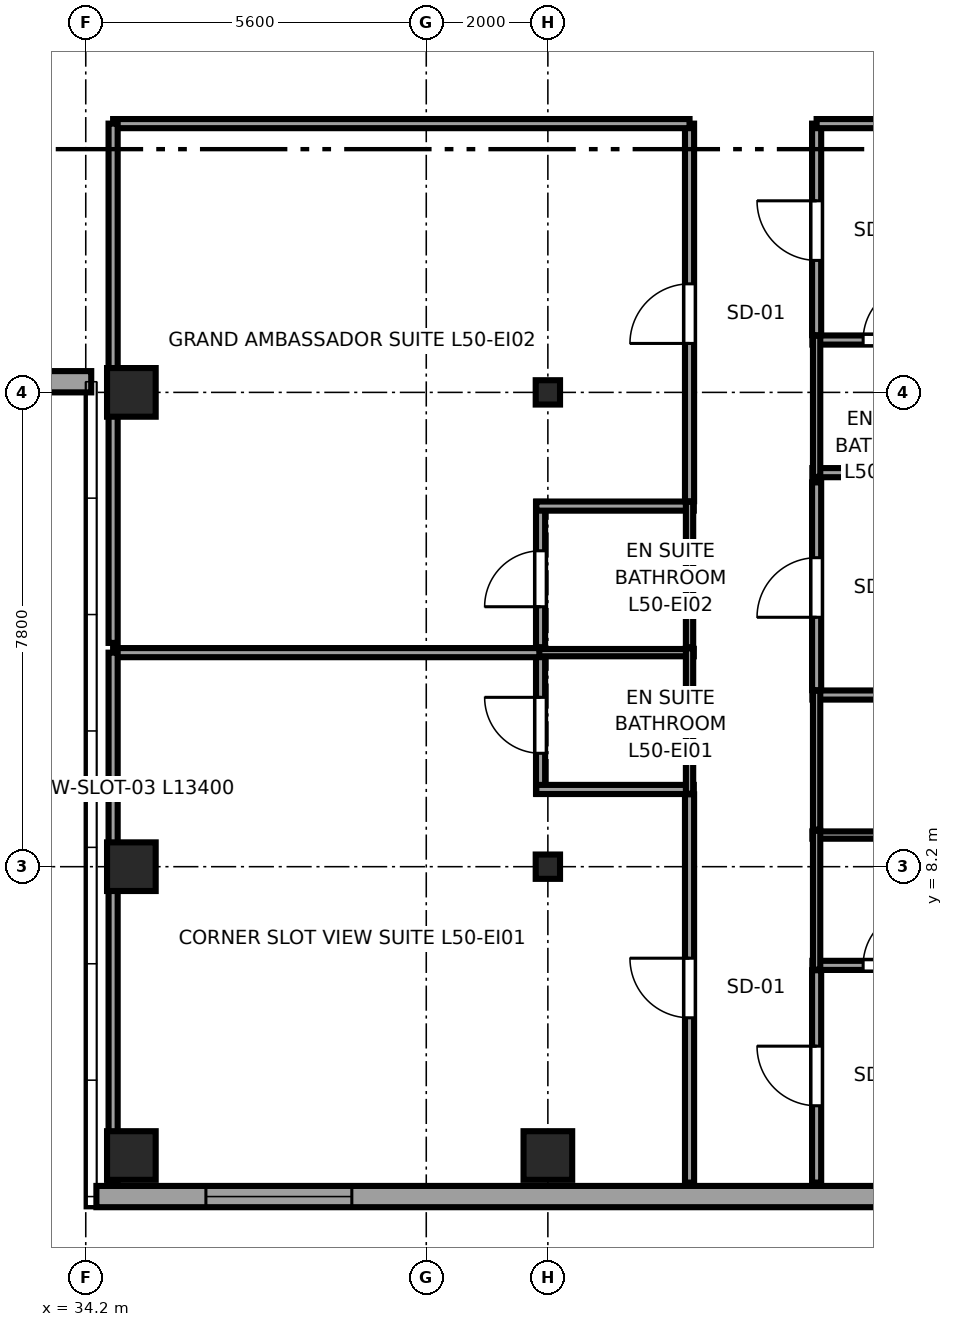
"""IFC4 building model, lengths in metres.
Left out: names, types, materials, properties, quantities, classifications, styles, units other than length and angle.
Written with IfcOpenShell. Run it as: python <this file> out.ifc"""

import sys

from ifc_helpers import new_model, si_unit, direction, frame, frame_2d, origin, origin_2d, place, context, subcontext, project, spatial, rectangle, i_section, extrude, source, transform, mapped, element, fill, save


model = new_model("IFC4")
c1 = context("Model", 3, precision=1e-05, world=origin(), true_north=direction((0.0, 1.0)))
c2 = subcontext(c1, "Body", "Model", "MODEL_VIEW")
j1 = project(units=[si_unit("LENGTHUNIT", "METRE"), si_unit("PLANEANGLEUNIT", "RADIAN")], contexts=[c1])
p1 = place(None, origin())
s1 = spatial("IfcSite", under=j1, at=p1, CompositionType="ELEMENT")
p2 = place(p1, origin())
s2 = spatial("IfcBuilding", under=s1, at=p2, CompositionType="ELEMENT")
p3 = place(p2, frame((0.0, 0.0, 191.1)))
s3 = spatial("IfcBuildingStorey", under=s2, at=p3, CompositionType="ELEMENT", Elevation=191.1)
m1 = source(origin(), c2, "Body", "SweptSolid", [
    extrude(rectangle(XDim=0.8, YDim=0.8, at=origin_2d()), origin(), (0.0, 0.0, 1.0), 3.55),
])
for number, where, z_axis, x_axis in (
    (1, (34.95, 3.45, 0.0), (0.0, 0.0, 1.0), (1.0, 0.0, 0.0)),
    (2, (34.95, 8.2, 0.0), (0.0, 0.0, 1.0), (1.0, 0.0, 0.0)),
    (3, (34.95, 16.0, 0.0), (0.0, 0.0, 1.0), (1.0, 0.0, 0.0)),
    (4, (41.8, 3.45, 0.0), (0.0, 0.0, 1.0), (1.0, 0.0, 0.0)),
):
    element("IfcColumn", number, at=place(p3, frame(where, z_axis=z_axis, x_axis=x_axis)), inside=s3, PredefinedType="COLUMN", context=c2, shape_type="MappedRepresentation", body=[
        mapped(m1, transform((0.0, 0.0, 0.0), x_axis=(1.0, 0.0, 0.0), y_axis=(0.0, 1.0, 0.0), z_axis=(0.0, 0.0, 1.0), scale=1.0)),
    ])
m2 = source(origin(), c2, "Body", "SweptSolid", [
    extrude(i_section(OverallWidth=0.4, OverallDepth=0.4, WebThickness=0.02, FlangeThickness=0.035, at=origin_2d()), origin(), (0.0, 0.0, 1.0), 3.55),
])
for number, where, z_axis, x_axis in (
    (5, (41.8, 8.2, 0.0), (0.0, 0.0, 1.0), (1.0, 0.0, 0.0)),
    (6, (41.8, 16.0, 0.0), (0.0, 0.0, 1.0), (1.0, 0.0, 0.0)),
):
    element("IfcColumn", number, at=place(p3, frame(where, z_axis=z_axis, x_axis=x_axis)), inside=s3, PredefinedType="COLUMN", context=c2, shape_type="MappedRepresentation", body=[
        mapped(m2, transform((0.0, 0.0, 0.0), x_axis=(1.0, 0.0, 0.0), y_axis=(0.0, 1.0, 0.0), z_axis=(0.0, 0.0, 1.0), scale=1.0)),
    ])
p4 = place(p3, frame((22.71, 16.175, 0.0), z_axis=(0.0, 0.0, 1.0), x_axis=(1.0, 0.0, 0.0)))
e7 = element("IfcWall", 7, at=p4, inside=s3, PredefinedType="SOLIDWALL", context=c2, shape_type="SweptSolid", body=[
    extrude(rectangle(XDim=11.58, YDim=0.35, at=frame_2d((5.79, 0.0))), origin(), (0.0, 0.0, 1.0), 2.758),
])
p5 = place(p4, frame((1.995, 0.0, 0.68)))
e8 = element("IfcOpeningElement", 8, at=p5, cuts=e7, PredefinedType="OPENING", context=c2, shape_type="SweptSolid", body=[
    extrude(rectangle(XDim=2.4, YDim=1.9, at=frame_2d((1.2, 0.95))), frame((0.0, 0.185, 0.0), z_axis=(0.0, -1.0, 0.0), x_axis=(1.0, 0.0, 0.0)), (0.0, 0.0, 1.0), 0.37),
])
p6 = place(p4, frame((7.185, 0.0, 0.68)))
e9 = element("IfcOpeningElement", 9, at=p6, cuts=e7, PredefinedType="OPENING", context=c2, shape_type="SweptSolid", body=[
    extrude(rectangle(XDim=2.4, YDim=1.9, at=frame_2d((1.2, 0.95))), frame((0.0, 0.185, 0.0), z_axis=(0.0, -1.0, 0.0), x_axis=(1.0, 0.0, 0.0)), (0.0, 0.0, 1.0), 0.37),
])
p7 = place(p3, frame((34.375, 2.775, 0.0), z_axis=(0.0, 0.0, 1.0), x_axis=(1.0, 0.0, 0.0)))
e10 = element("IfcWall", 10, at=p7, inside=s3, PredefinedType="SOLIDWALL", context=c2, shape_type="SweptSolid", body=[
    extrude(rectangle(XDim=15.608, YDim=0.35, at=frame_2d((7.804, 0.0))), origin(), (0.0, 0.0, 1.0), 3.37),
])
p8 = place(p7, frame((1.801, 0.0, 0.68)))
e11 = element("IfcOpeningElement", 11, at=p8, cuts=e10, PredefinedType="OPENING", context=c2, shape_type="SweptSolid", body=[
    extrude(rectangle(XDim=2.4, YDim=1.9, at=frame_2d((1.2, 0.95))), frame((0.0, 0.185, 0.0), z_axis=(0.0, -1.0, 0.0), x_axis=(1.0, 0.0, 0.0)), (0.0, 0.0, 1.0), 0.37),
])
p9 = place(p7, frame((12.891, 0.0, 0.62)))
e12 = element("IfcOpeningElement", 12, at=p9, cuts=e10, PredefinedType="OPENING", context=c2, shape_type="SweptSolid", body=[
    extrude(rectangle(XDim=1.5, YDim=1.55, at=frame_2d((0.75, 0.775))), frame((0.0, 0.185, 0.0), z_axis=(0.0, -1.0, 0.0), x_axis=(1.0, 0.0, 0.0)), (0.0, 0.0, 1.0), 0.37),
])
p10 = place(p3, frame((41.68, 9.4, 0.0), z_axis=(0.0, 0.0, 1.0), x_axis=(0.0, 1.0, 0.0)))
e13 = element("IfcWall", 13, at=p10, inside=s3, PredefinedType="PARTITIONING", context=c2, shape_type="SweptSolid", body=[
    extrude(rectangle(XDim=2.39, YDim=0.15, at=frame_2d((1.195, 0.0))), origin(), (0.0, 0.0, 1.0), 2.827),
])
p11 = place(p10, frame((0.665, 0.0, 0.0)))
e14 = element("IfcOpeningElement", 14, at=p11, cuts=e13, PredefinedType="OPENING", context=c2, shape_type="SweptSolid", body=[
    extrude(rectangle(XDim=0.92, YDim=2.01, at=frame_2d((0.46, 1.005))), frame((0.0, 0.085, 0.0), z_axis=(0.0, -1.0, 0.0), x_axis=(1.0, 0.0, 0.0)), (0.0, 0.0, 1.0), 0.17),
])
p12 = place(p3, frame((41.61, 9.47, 0.0), z_axis=(0.0, 0.0, 1.0), x_axis=(1.0, 0.0, 0.0)))
e15 = element("IfcWall", 15, at=p12, inside=s3, PredefinedType="PARTITIONING", context=c2, shape_type="SweptSolid", body=[
    extrude(rectangle(XDim=2.59, YDim=0.15, at=frame_2d((1.295, 0.0))), origin(), (0.0, 0.0, 1.0), 3.37),
])
p13 = place(p3, frame((41.61, 11.72, 0.0), z_axis=(0.0, 0.0, 1.0), x_axis=(1.0, 0.0, 0.0)))
e16 = element("IfcWall", 16, at=p13, inside=s3, PredefinedType="PLUMBINGWALL", context=c2, shape_type="SweptSolid", body=[
    extrude(rectangle(XDim=2.59, YDim=0.12, at=frame_2d((1.295, 0.0))), origin(), (0.0, 0.0, 1.0), 3.37),
])
p14 = place(p3, frame((44.13, 9.4, 0.0), z_axis=(0.0, 0.0, 1.0), x_axis=(0.0, 1.0, 0.0)))
e17 = element("IfcWall", 17, at=p14, inside=s3, PredefinedType="PLUMBINGWALL", context=c2, shape_type="SweptSolid", body=[
    extrude(rectangle(XDim=2.39, YDim=0.12, at=frame_2d((1.195, 0.0))), origin(), (0.0, 0.0, 1.0), 3.37),
])
p15 = place(p3, frame((41.68, 11.81, 0.0), z_axis=(0.0, 0.0, 1.0), x_axis=(0.0, 1.0, 0.0)))
e18 = element("IfcWall", 18, at=p15, inside=s3, PredefinedType="PARTITIONING", context=c2, shape_type="SweptSolid", body=[
    extrude(rectangle(XDim=2.39, YDim=0.15, at=frame_2d((1.195, 0.0))), origin(), (0.0, 0.0, 1.0), 2.827),
])
p16 = place(p15, frame((0.665, 0.0, 0.0)))
e19 = element("IfcOpeningElement", 19, at=p16, cuts=e18, PredefinedType="OPENING", context=c2, shape_type="SweptSolid", body=[
    extrude(rectangle(XDim=0.92, YDim=2.01, at=frame_2d((0.46, 1.005))), frame((0.0, 0.085, 0.0), z_axis=(0.0, -1.0, 0.0), x_axis=(1.0, 0.0, 0.0)), (0.0, 0.0, 1.0), 0.17),
])
p17 = place(p3, frame((41.61, 14.13, 0.0), z_axis=(0.0, 0.0, 1.0), x_axis=(1.0, 0.0, 0.0)))
e20 = element("IfcWall", 20, at=p17, inside=s3, PredefinedType="PARTITIONING", context=c2, shape_type="SweptSolid", body=[
    extrude(rectangle(XDim=2.59, YDim=0.15, at=frame_2d((1.295, 0.0))), origin(), (0.0, 0.0, 1.0), 3.37),
])
p18 = place(p3, frame((44.13, 11.81, 0.0), z_axis=(0.0, 0.0, 1.0), x_axis=(0.0, 1.0, 0.0)))
e21 = element("IfcWall", 21, at=p18, inside=s3, PredefinedType="PLUMBINGWALL", context=c2, shape_type="SweptSolid", body=[
    extrude(rectangle(XDim=2.39, YDim=0.12, at=frame_2d((1.195, 0.0))), origin(), (0.0, 0.0, 1.0), 3.37),
])
p19 = place(p3, frame((46.15, 6.577, 0.0), z_axis=(0.0, 0.0, 1.0), x_axis=(1.0, 0.0, 0.0)))
e22 = element("IfcWall", 22, at=p19, inside=s3, PredefinedType="PARTITIONING", context=c2, shape_type="SweptSolid", body=[
    extrude(rectangle(XDim=2.59, YDim=0.15, at=frame_2d((1.295, 0.0))), origin(), (0.0, 0.0, 1.0), 3.37),
])
p20 = place(p19, frame((0.835, 0.0, 0.0)))
e23 = element("IfcOpeningElement", 23, at=p20, cuts=e22, PredefinedType="OPENING", context=c2, shape_type="SweptSolid", body=[
    extrude(rectangle(XDim=0.92, YDim=2.01, at=frame_2d((0.46, 1.005))), frame((0.0, 0.085, 0.0), z_axis=(0.0, -1.0, 0.0), x_axis=(1.0, 0.0, 0.0)), (0.0, 0.0, 1.0), 0.17),
])
p21 = place(p3, frame((46.15, 8.72, 0.0), z_axis=(0.0, 0.0, 1.0), x_axis=(1.0, 0.0, 0.0)))
e24 = element("IfcWall", 24, at=p21, inside=s3, PredefinedType="PLUMBINGWALL", context=c2, shape_type="SweptSolid", body=[
    extrude(rectangle(XDim=2.59, YDim=0.12, at=frame_2d((1.295, 0.0))), origin(), (0.0, 0.0, 1.0), 3.37),
])
p22 = place(p3, frame((46.22, 6.507, 0.0), z_axis=(0.0, 0.0, 1.0), x_axis=(0.0, 1.0, 0.0)))
e25 = element("IfcWall", 25, at=p22, inside=s3, PredefinedType="PLUMBINGWALL", context=c2, shape_type="SweptSolid", body=[
    extrude(rectangle(XDim=2.283, YDim=0.12, at=frame_2d((1.142, 0.0))), origin(), (0.0, 0.0, 1.0), 3.37),
])
p23 = place(p3, frame((46.15, 11.023, 0.0), z_axis=(0.0, 0.0, 1.0), x_axis=(1.0, 0.0, 0.0)))
e26 = element("IfcWall", 26, at=p23, inside=s3, PredefinedType="PARTITIONING", context=c2, shape_type="SweptSolid", body=[
    extrude(rectangle(XDim=2.59, YDim=0.15, at=frame_2d((1.295, 0.0))), origin(), (0.0, 0.0, 1.0), 3.37),
])
p24 = place(p3, frame((46.22, 8.81, 0.0), z_axis=(0.0, 0.0, 1.0), x_axis=(0.0, 1.0, 0.0)))
e27 = element("IfcWall", 27, at=p24, inside=s3, PredefinedType="PLUMBINGWALL", context=c2, shape_type="SweptSolid", body=[
    extrude(rectangle(XDim=2.283, YDim=0.12, at=frame_2d((1.142, 0.0))), origin(), (0.0, 0.0, 1.0), 3.37),
])
p25 = place(p3, frame((46.15, 14.68, 0.0), z_axis=(0.0, 0.0, 1.0), x_axis=(1.0, 0.0, 0.0)))
e28 = element("IfcWall", 28, at=p25, inside=s3, PredefinedType="PARTITIONING", context=c2, shape_type="SweptSolid", body=[
    extrude(rectangle(XDim=7.845, YDim=0.15, at=frame_2d((3.923, 0.0))), origin(), (0.0, 0.0, 1.0), 3.37),
])
p26 = place(p3, frame((46.15, 16.861, 0.0), z_axis=(0.0, 0.0, 1.0), x_axis=(1.0, 0.0, 0.0)))
e29 = element("IfcWall", 29, at=p26, inside=s3, PredefinedType="PARTITIONING", context=c2, shape_type="SweptSolid", body=[
    extrude(rectangle(XDim=2.59, YDim=0.15, at=frame_2d((1.295, 0.0))), origin(), (0.0, 0.0, 1.0), 3.37),
])
p27 = place(p26, frame((0.835, 0.0, 0.0)))
e30 = element("IfcOpeningElement", 30, at=p27, cuts=e29, PredefinedType="OPENING", context=c2, shape_type="SweptSolid", body=[
    extrude(rectangle(XDim=0.92, YDim=2.01, at=frame_2d((0.46, 1.005))), frame((0.0, 0.085, 0.0), z_axis=(0.0, -1.0, 0.0), x_axis=(1.0, 0.0, 0.0)), (0.0, 0.0, 1.0), 0.17),
])
p28 = place(p3, frame((46.22, 14.61, 0.0), z_axis=(0.0, 0.0, 1.0), x_axis=(0.0, 1.0, 0.0)))
e31 = element("IfcWall", 31, at=p28, inside=s3, PredefinedType="PLUMBINGWALL", context=c2, shape_type="SweptSolid", body=[
    extrude(rectangle(XDim=2.321, YDim=0.12, at=frame_2d((1.16, 0.0))), origin(), (0.0, 0.0, 1.0), 3.37),
])
p29 = place(p3, frame((44.13, 3.005, 0.0), z_axis=(0.0, 0.0, 1.0), x_axis=(0.0, 1.0, 0.0)))
e32 = element("IfcWall", 32, at=p29, inside=s3, PredefinedType="PARTITIONING", context=c2, shape_type="SweptSolid", body=[
    extrude(rectangle(XDim=6.385, YDim=0.15, at=frame_2d((3.192, 0.0))), origin(), (0.0, 0.0, 1.0), 3.37),
])
p30 = place(p29, frame((2.71, 0.0, 0.0)))
e33 = element("IfcOpeningElement", 33, at=p30, cuts=e32, PredefinedType="OPENING", context=c2, shape_type="SweptSolid", body=[
    extrude(rectangle(XDim=0.98, YDim=2.12, at=frame_2d((0.49, 1.06))), frame((0.0, 0.085, 0.0), z_axis=(0.0, -1.0, 0.0), x_axis=(1.0, 0.0, 0.0)), (0.0, 0.0, 1.0), 0.17),
])
p31 = place(p3, frame((34.65, 11.72, 0.0), z_axis=(0.0, 0.0, 1.0), x_axis=(1.0, 0.0, 0.0)))
e34 = element("IfcWall", 34, at=p31, inside=s3, PredefinedType="PARTITIONING", context=c2, shape_type="SweptSolid", body=[
    extrude(rectangle(XDim=7.01, YDim=0.15, at=frame_2d((3.505, 0.0))), origin(), (0.0, 0.0, 1.0), 3.37),
])
p32 = place(p3, frame((34.65, 3.005, 0.0), z_axis=(0.0, 0.0, 1.0), x_axis=(0.0, 1.0, 0.0)))
e35 = element("IfcWall", 35, at=p32, inside=s3, PredefinedType="PARTITIONING", context=c2, shape_type="SweptSolid", body=[
    extrude(rectangle(XDim=8.715, YDim=0.15, at=frame_2d((4.357, 0.0))), origin(), (0.0, 0.0, 1.0), 3.37),
])
p33 = place(p3, frame((44.13, 14.21, 0.0), z_axis=(0.0, 0.0, 1.0), x_axis=(0.0, 1.0, 0.0)))
e36 = element("IfcWall", 36, at=p33, inside=s3, PredefinedType="PARTITIONING", context=c2, shape_type="SweptSolid", body=[
    extrude(rectangle(XDim=6.21, YDim=0.15, at=frame_2d((3.105, 0.0))), origin(), (0.0, 0.0, 1.0), 3.37),
])
p34 = place(p33, frame((2.595, 0.0, 0.0)))
e37 = element("IfcOpeningElement", 37, at=p34, cuts=e36, PredefinedType="OPENING", context=c2, shape_type="SweptSolid", body=[
    extrude(rectangle(XDim=0.98, YDim=2.12, at=frame_2d((0.49, 1.06))), frame((0.0, 0.085, 0.0), z_axis=(0.0, -1.0, 0.0), x_axis=(1.0, 0.0, 0.0)), (0.0, 0.0, 1.0), 0.17),
])
p35 = place(p3, frame((34.65, 20.42, 0.0), z_axis=(0.0, 0.0, 1.0), x_axis=(1.0, 0.0, 0.0)))
e38 = element("IfcWall", 38, at=p35, inside=s3, PredefinedType="PARTITIONING", context=c2, shape_type="SweptSolid", body=[
    extrude(rectangle(XDim=9.48, YDim=0.15, at=frame_2d((4.74, 0.0))), origin(), (0.0, 0.0, 1.0), 3.37),
])
p36 = place(p3, frame((34.65, 11.88, 0.0), z_axis=(0.0, 0.0, 1.0), x_axis=(0.0, 1.0, 0.0)))
e39 = element("IfcWall", 39, at=p36, inside=s3, PredefinedType="PARTITIONING", context=c2, shape_type="SweptSolid", body=[
    extrude(rectangle(XDim=8.54, YDim=0.15, at=frame_2d((4.27, 0.0))), origin(), (0.0, 0.0, 1.0), 3.37),
])
p37 = place(p3, frame((46.22, 3.005, 0.0), z_axis=(0.0, 0.0, 1.0), x_axis=(0.0, 1.0, 0.0)))
e40 = element("IfcWall", 40, at=p37, inside=s3, PredefinedType="PARTITIONING", context=c2, shape_type="SweptSolid", body=[
    extrude(rectangle(XDim=3.492, YDim=0.15, at=frame_2d((1.746, 0.0))), origin(), (0.0, 0.0, 1.0), 3.37),
])
p38 = place(p37, frame((1.263, 0.0, 0.0)))
e41 = element("IfcOpeningElement", 41, at=p38, cuts=e40, PredefinedType="OPENING", context=c2, shape_type="SweptSolid", body=[
    extrude(rectangle(XDim=0.98, YDim=2.12, at=frame_2d((0.49, 1.06))), frame((0.0, 0.085, 0.0), z_axis=(0.0, -1.0, 0.0), x_axis=(1.0, 0.0, 0.0)), (0.0, 0.0, 1.0), 0.17),
])
p39 = place(p3, frame((46.22, 11.103, 0.0), z_axis=(0.0, 0.0, 1.0), x_axis=(0.0, 1.0, 0.0)))
e42 = element("IfcWall", 42, at=p39, inside=s3, PredefinedType="PARTITIONING", context=c2, shape_type="SweptSolid", body=[
    extrude(rectangle(XDim=3.417, YDim=0.15, at=frame_2d((1.708, 0.0))), origin(), (0.0, 0.0, 1.0), 3.37),
])
p40 = place(p39, frame((1.198, 0.0, 0.0)))
e43 = element("IfcOpeningElement", 43, at=p40, cuts=e42, PredefinedType="OPENING", context=c2, shape_type="SweptSolid", body=[
    extrude(rectangle(XDim=0.98, YDim=2.12, at=frame_2d((0.49, 1.06))), frame((0.0, 0.085, 0.0), z_axis=(0.0, -1.0, 0.0), x_axis=(1.0, 0.0, 0.0)), (0.0, 0.0, 1.0), 0.17),
])
p41 = place(p3, frame((46.22, 16.941, 0.0), z_axis=(0.0, 0.0, 1.0), x_axis=(0.0, 1.0, 0.0)))
e44 = element("IfcWall", 44, at=p41, inside=s3, PredefinedType="PARTITIONING", context=c2, shape_type="SweptSolid", body=[
    extrude(rectangle(XDim=3.479, YDim=0.15, at=frame_2d((1.74, 0.0))), origin(), (0.0, 0.0, 1.0), 3.37),
])
p42 = place(p41, frame((1.229, 0.0, 0.0)))
e45 = element("IfcOpeningElement", 45, at=p42, cuts=e44, PredefinedType="OPENING", context=c2, shape_type="SweptSolid", body=[
    extrude(rectangle(XDim=0.98, YDim=2.12, at=frame_2d((0.49, 1.06))), frame((0.0, 0.085, 0.0), z_axis=(0.0, -1.0, 0.0), x_axis=(1.0, 0.0, 0.0)), (0.0, 0.0, 1.0), 0.17),
])
p43 = place(p3, frame((46.22, 20.42, 0.0), z_axis=(0.0, 0.0, 1.0), x_axis=(1.0, 0.0, 0.0)))
e46 = element("IfcWall", 46, at=p43, inside=s3, PredefinedType="PARTITIONING", context=c2, shape_type="SweptSolid", body=[
    extrude(rectangle(XDim=7.775, YDim=0.15, at=frame_2d((3.888, 0.0))), origin(), (0.0, 0.0, 1.0), 3.37),
])
m3 = source(origin(), c2, "Body", "SweptSolid", [
    extrude(rectangle(XDim=2.4, YDim=1.9, at=frame_2d((1.2, 0.95))), frame((0.0, 0.09, 0.0), z_axis=(0.0, -1.0, 0.0), x_axis=(1.0, 0.0, 0.0)), (0.0, 0.0, 1.0), 0.06),
])
p44 = place(p8, origin())
e47 = element("IfcWindow", 47, at=p44, inside=s3, PartitioningType="TRIPLE_PANEL_HORIZONTAL", PredefinedType="WINDOW", context=c2, shape_type="MappedRepresentation", body=[
    mapped(m3, transform((0.0, 0.0, 0.0), x_axis=(1.0, 0.0, 0.0), y_axis=(0.0, 1.0, 0.0), z_axis=(0.0, 0.0, 1.0), scale=1.0)),
])
fill(e11, e47)
m4 = source(origin(), c2, "Body", "SweptSolid", [
    extrude(rectangle(XDim=0.92, YDim=2.01, at=frame_2d((0.46, 1.005))), frame((0.0, 0.025, 0.0), z_axis=(0.0, -1.0, 0.0), x_axis=(1.0, 0.0, 0.0)), (0.0, 0.0, 1.0), 0.05),
])
p45 = place(p11, origin())
e48 = element("IfcDoor", 48, at=p45, inside=s3, OperationType="SINGLE_SWING_RIGHT", PredefinedType="DOOR", context=c2, shape_type="MappedRepresentation", body=[
    mapped(m4, transform((0.0, 0.0, 0.0), x_axis=(1.0, 0.0, 0.0), y_axis=(0.0, 1.0, 0.0), z_axis=(0.0, 0.0, 1.0), scale=1.0)),
])
fill(e14, e48)
p46 = place(p16, origin())
e49 = element("IfcDoor", 49, at=p46, inside=s3, OperationType="SINGLE_SWING_LEFT", PredefinedType="DOOR", context=c2, shape_type="MappedRepresentation", body=[
    mapped(m4, transform((0.0, 0.0, 0.0), x_axis=(1.0, 0.0, 0.0), y_axis=(0.0, 1.0, 0.0), z_axis=(0.0, 0.0, 1.0), scale=1.0)),
])
fill(e19, e49)
p47 = place(p20, origin())
e50 = element("IfcDoor", 50, at=p47, inside=s3, OperationType="SINGLE_SWING_RIGHT", PredefinedType="DOOR", context=c2, shape_type="MappedRepresentation", body=[
    mapped(m4, transform((0.0, 0.0, 0.0), x_axis=(1.0, 0.0, 0.0), y_axis=(0.0, 1.0, 0.0), z_axis=(0.0, 0.0, 1.0), scale=1.0)),
])
fill(e23, e50)
p48 = place(p27, origin())
e51 = element("IfcDoor", 51, at=p48, inside=s3, OperationType="SINGLE_SWING_RIGHT", PredefinedType="DOOR", context=c2, shape_type="MappedRepresentation", body=[
    mapped(m4, transform((0.0, 0.0, 0.0), x_axis=(1.0, 0.0, 0.0), y_axis=(0.0, 1.0, 0.0), z_axis=(0.0, 0.0, 1.0), scale=1.0)),
])
fill(e30, e51)
m5 = source(origin(), c2, "Body", "SweptSolid", [
    extrude(rectangle(XDim=0.98, YDim=2.12, at=frame_2d((0.49, 1.06))), frame((0.0, 0.025, 0.0), z_axis=(0.0, -1.0, 0.0), x_axis=(1.0, 0.0, 0.0)), (0.0, 0.0, 1.0), 0.05),
])
p49 = place(p30, origin())
e52 = element("IfcDoor", 52, at=p49, inside=s3, OperationType="SINGLE_SWING_RIGHT", PredefinedType="DOOR", context=c2, shape_type="MappedRepresentation", body=[
    mapped(m5, transform((0.0, 0.0, 0.0), x_axis=(1.0, 0.0, 0.0), y_axis=(0.0, 1.0, 0.0), z_axis=(0.0, 0.0, 1.0), scale=1.0)),
])
fill(e33, e52)
p50 = place(p34, origin())
e53 = element("IfcDoor", 53, at=p50, inside=s3, OperationType="SINGLE_SWING_LEFT", PredefinedType="DOOR", context=c2, shape_type="MappedRepresentation", body=[
    mapped(m5, transform((0.0, 0.0, 0.0), x_axis=(1.0, 0.0, 0.0), y_axis=(0.0, 1.0, 0.0), z_axis=(0.0, 0.0, 1.0), scale=1.0)),
])
fill(e37, e53)
p51 = place(p38, origin())
e54 = element("IfcDoor", 54, at=p51, inside=s3, OperationType="SINGLE_SWING_RIGHT", PredefinedType="DOOR", context=c2, shape_type="MappedRepresentation", body=[
    mapped(m5, transform((0.0, 0.0, 0.0), x_axis=(1.0, 0.0, 0.0), y_axis=(0.0, 1.0, 0.0), z_axis=(0.0, 0.0, 1.0), scale=1.0)),
])
fill(e41, e54)
p52 = place(p40, origin())
e55 = element("IfcDoor", 55, at=p52, inside=s3, OperationType="SINGLE_SWING_LEFT", PredefinedType="DOOR", context=c2, shape_type="MappedRepresentation", body=[
    mapped(m5, transform((0.0, 0.0, 0.0), x_axis=(1.0, 0.0, 0.0), y_axis=(0.0, 1.0, 0.0), z_axis=(0.0, 0.0, 1.0), scale=1.0)),
])
fill(e43, e55)
p53 = place(p42, origin())
e56 = element("IfcDoor", 56, at=p53, inside=s3, OperationType="SINGLE_SWING_RIGHT", PredefinedType="DOOR", context=c2, shape_type="MappedRepresentation", body=[
    mapped(m5, transform((0.0, 0.0, 0.0), x_axis=(1.0, 0.0, 0.0), y_axis=(0.0, 1.0, 0.0), z_axis=(0.0, 0.0, 1.0), scale=1.0)),
])
fill(e45, e56)
save(model, sys.argv[1])
